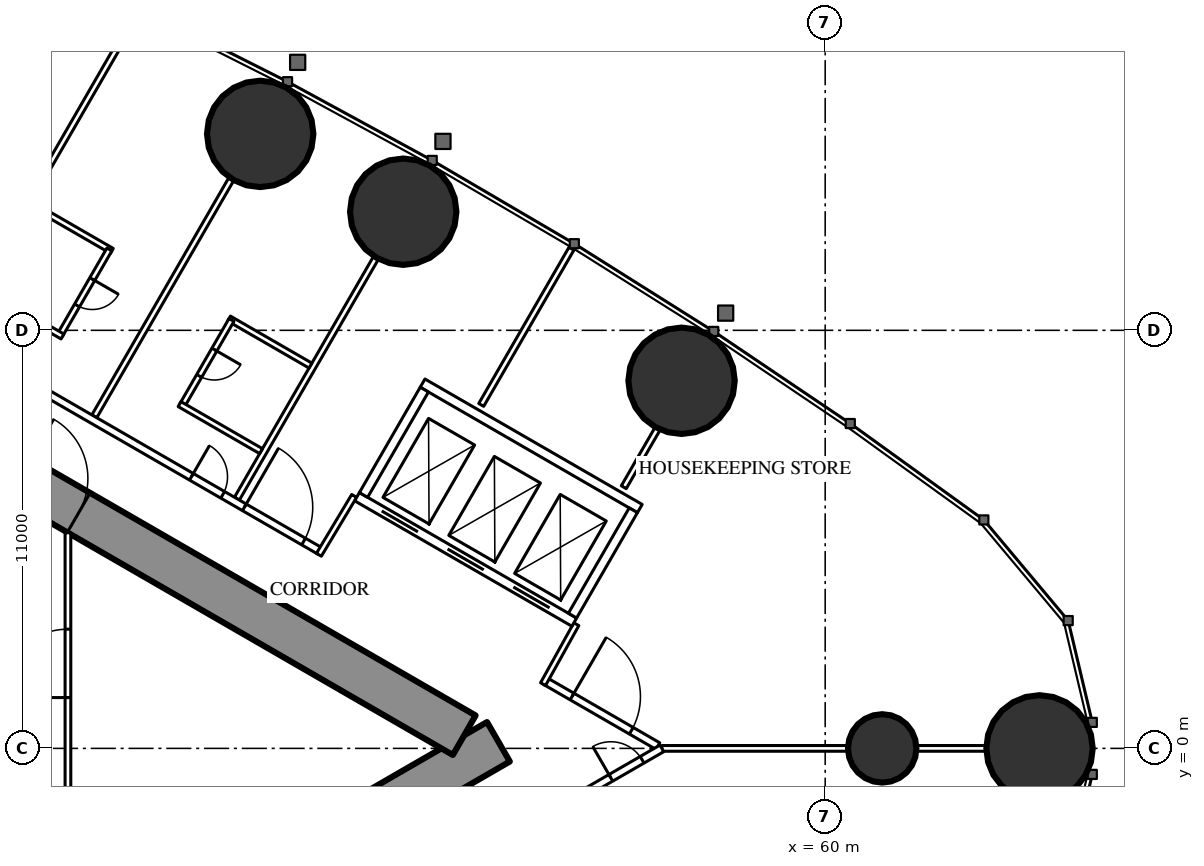
"""IFC4 building model, lengths in metres.
Left out: names, types, materials, properties, quantities, classifications, styles, units other than length and angle.
Written with IfcOpenShell. Run it as: python <this file> out.ifc"""

import sys

from ifc_helpers import new_model, si_unit, direction, frame, frame_2d, origin, origin_2d, place, context, subcontext, project, spatial, rectangle, circle, extrude, element, fill, save


model = new_model("IFC4")
c1 = context("Model", 3, precision=1e-05, world=origin(), true_north=direction((0.0, 1.0)))
c2 = subcontext(c1, "Body", "Model", "MODEL_VIEW")
j1 = project(units=[si_unit("LENGTHUNIT", "METRE"), si_unit("PLANEANGLEUNIT", "RADIAN")], contexts=[c1])
p1 = place(None, origin())
s1 = spatial("IfcSite", under=j1, at=p1, CompositionType="ELEMENT")
p2 = place(p1, origin())
s2 = spatial("IfcBuilding", under=s1, at=p2, CompositionType="ELEMENT")
p3 = place(p2, frame((0.0, 0.0, 180.8)))
s3 = spatial("IfcBuildingStorey", under=s2, at=p3, CompositionType="ELEMENT", Elevation=180.8)
for number, where, z_axis, x_axis in (
    (1, (65.64, 0.0, 0.0), (0.0, 0.0, 1.0), (1.0, 0.0, 0.0)),
    (2, (56.221, 9.672, 0.0), (0.0, 0.0, 1.0), (1.0, 0.0, 0.0)),
    (3, (48.897, 14.121, 0.0), (0.0, 0.0, 1.0), (1.0, 0.0, 0.0)),
    (4, (45.134, 16.168, 0.0), (0.0, 0.0, 1.0), (1.0, 0.0, 0.0)),
):
    element("IfcColumn", number, at=place(p3, frame(where, z_axis=z_axis, x_axis=x_axis)), inside=s3, PredefinedType="COLUMN", context=c2, shape_type="SweptSolid", body=[
        extrude(circle(Radius=1.4, at=origin_2d()), origin(), (0.0, 0.0, 1.0), 3.5),
    ])
p4 = place(p3, frame((61.5, 0.0, 0.0), z_axis=(0.0, 0.0, 1.0), x_axis=(1.0, 0.0, 0.0)))
e5 = element("IfcColumn", 5, at=p4, inside=s3, PredefinedType="COLUMN", context=c2, shape_type="SweptSolid", body=[
    extrude(circle(Radius=0.9, at=origin_2d()), origin(), (0.0, 0.0, 1.0), 3.5),
])
p5 = place(p3, frame((27.2, -13.8, 0.0), z_axis=(0.0, 0.0, 1.0), x_axis=(0.866027159892, 0.499996958321, 0.0)))
e6 = element("IfcWall", 6, at=p5, inside=s3, PredefinedType="SHEAR", context=c2, shape_type="SweptSolid", body=[
    extrude(rectangle(XDim=27.947, YDim=1.2, at=frame_2d((13.973, 0.0))), origin(), (0.0, 0.0, 1.0), 3.5),
])
p6 = place(p5, frame((4.6, 0.0, 0.0)))
e7 = element("IfcOpeningElement", 7, at=p6, cuts=e6, PredefinedType="OPENING", context=c2, shape_type="SweptSolid", body=[
    extrude(rectangle(XDim=1.0, YDim=2.2, at=frame_2d((0.5, 1.1))), frame((0.0, 0.61, 0.0), z_axis=(0.0, -1.0, 0.0), x_axis=(1.0, 0.0, 0.0)), (0.0, 0.0, 1.0), 1.22),
])
p7 = place(p5, frame((13.395, 0.0, 0.0)))
e8 = element("IfcOpeningElement", 8, at=p7, cuts=e6, PredefinedType="OPENING", context=c2, shape_type="SweptSolid", body=[
    extrude(rectangle(XDim=1.8, YDim=2.2, at=frame_2d((0.9, 1.1))), frame((0.0, 0.61, 0.0), z_axis=(0.0, -1.0, 0.0), x_axis=(1.0, 0.0, 0.0)), (0.0, 0.0, 1.0), 1.22),
])
p8 = place(p3, frame((27.2, 13.8, 0.0), z_axis=(0.0, 0.0, 1.0), x_axis=(0.866024515034, -0.500001539357, 0.0)))
e9 = element("IfcWall", 9, at=p8, inside=s3, PredefinedType="SHEAR", context=c2, shape_type="SweptSolid", body=[
    extrude(rectangle(XDim=26.907, YDim=1.2, at=frame_2d((13.454, 0.0))), origin(), (0.0, 0.0, 1.0), 3.5),
])
p9 = place(p8, frame((4.6, 0.0, 0.0)))
e10 = element("IfcOpeningElement", 10, at=p9, cuts=e9, PredefinedType="OPENING", context=c2, shape_type="SweptSolid", body=[
    extrude(rectangle(XDim=1.0, YDim=2.2, at=frame_2d((0.5, 1.1))), frame((0.0, 0.61, 0.0), z_axis=(0.0, -1.0, 0.0), x_axis=(1.0, 0.0, 0.0)), (0.0, 0.0, 1.0), 1.22),
])
p10 = place(p8, frame((13.395, 0.0, 0.0)))
e11 = element("IfcOpeningElement", 11, at=p10, cuts=e9, PredefinedType="OPENING", context=c2, shape_type="SweptSolid", body=[
    extrude(rectangle(XDim=1.8, YDim=2.2, at=frame_2d((0.9, 1.1))), frame((0.0, 0.61, 0.0), z_axis=(0.0, -1.0, 0.0), x_axis=(1.0, 0.0, 0.0)), (0.0, 0.0, 1.0), 1.22),
])
p11 = place(p3, frame((37.022, 10.9, 0.0), z_axis=(0.0, 0.0, 1.0), x_axis=(0.499998620953, 0.866026199976, 0.0)))
e12 = element("IfcWall", 12, at=p11, inside=s3, PredefinedType="PARTITIONING", context=c2, shape_type="SweptSolid", body=[
    extrude(rectangle(XDim=9.77, YDim=0.15, at=frame_2d((4.885, 0.0))), origin(), (0.0, 0.0, 1.0), 3.25),
])
p12 = place(p3, frame((40.769, 8.737, 0.0), z_axis=(0.0, 0.0, 1.0), x_axis=(0.500013115284, 0.866017831539, 0.0)))
e13 = element("IfcWall", 13, at=p12, inside=s3, PredefinedType="PARTITIONING", context=c2, shape_type="SweptSolid", body=[
    extrude(rectangle(XDim=7.198, YDim=0.15, at=frame_2d((3.599, 0.0))), origin(), (0.0, 0.0, 1.0), 2.3),
])
p13 = place(p3, frame((44.521, 6.571, 0.0), z_axis=(0.0, 0.0, 1.0), x_axis=(0.500020376429, 0.866013639128, 0.0)))
e14 = element("IfcWall", 14, at=p13, inside=s3, PredefinedType="PARTITIONING", context=c2, shape_type="SweptSolid", body=[
    extrude(rectangle(XDim=7.306, YDim=0.15, at=frame_2d((3.653, 0.0))), origin(), (0.0, 0.0, 1.0), 2.3),
])
p14 = place(p3, frame((55.702, 0.0, 0.0), z_axis=(0.0, 0.0, 1.0), x_axis=(1.0, 0.0, 0.0)))
e15 = element("IfcWall", 15, at=p14, inside=s3, PredefinedType="PARTITIONING", context=c2, shape_type="SweptSolid", body=[
    extrude(rectangle(XDim=8.518, YDim=0.15, at=frame_2d((4.259, 0.0))), origin(), (0.0, 0.0, 1.0), 2.3),
])
p15 = place(p3, frame((50.95, 9.037, 0.0), z_axis=(0.0, 0.0, 1.0), x_axis=(0.499988022762, 0.866032318735, 0.0)))
e16 = element("IfcWall", 16, at=p15, inside=s3, PredefinedType="PARTITIONING", context=c2, shape_type="SweptSolid", body=[
    extrude(rectangle(XDim=4.748, YDim=0.15, at=frame_2d((2.374, 0.0))), origin(), (0.0, 0.0, 1.0), 3.25),
])
p16 = place(p3, frame((54.7, 6.872, 0.0), z_axis=(0.0, 0.0, 1.0), x_axis=(0.499989690894, 0.866031355668, 0.0)))
e17 = element("IfcWall", 17, at=p16, inside=s3, PredefinedType="PARTITIONING", context=c2, shape_type="SweptSolid", body=[
    extrude(rectangle(XDim=1.766, YDim=0.15, at=frame_2d((0.883, 0.0))), origin(), (0.0, 0.0, 1.0), 3.25),
])
p17 = place(p3, frame((27.959, 16.017, 0.0), z_axis=(0.0, 0.0, 1.0), x_axis=(0.866027146794, -0.499996981007, 0.0)))
e18 = element("IfcWall", 18, at=p17, inside=s3, PredefinedType="PARTITIONING", context=c2, shape_type="SweptSolid", body=[
    extrude(rectangle(XDim=21.657, YDim=0.2, at=frame_2d((10.829, 0.0))), origin(), (0.0, 0.0, 1.0), 3.25),
])
p18 = place(p17, frame((17.741, 0.0, 0.0)))
e19 = element("IfcOpeningElement", 19, at=p18, cuts=e18, PredefinedType="OPENING", context=c2, shape_type="SweptSolid", body=[
    extrude(rectangle(XDim=0.95, YDim=2.2, at=frame_2d((0.475, 1.1))), frame((0.0, 0.11, 0.0), z_axis=(0.0, -1.0, 0.0), x_axis=(1.0, 0.0, 0.0)), (0.0, 0.0, 1.0), 0.22),
])
p19 = place(p17, frame((10.782, 0.0, 0.0)))
e20 = element("IfcOpeningElement", 20, at=p19, cuts=e18, PredefinedType="OPENING", context=c2, shape_type="SweptSolid", body=[
    extrude(rectangle(XDim=0.95, YDim=2.2, at=frame_2d((0.475, 1.1))), frame((0.0, 0.11, 0.0), z_axis=(0.0, -1.0, 0.0), x_axis=(1.0, 0.0, 0.0)), (0.0, 0.0, 1.0), 0.22),
])
p20 = place(p17, frame((6.732, 0.0, 0.0)))
e21 = element("IfcOpeningElement", 21, at=p20, cuts=e18, PredefinedType="OPENING", context=c2, shape_type="SweptSolid", body=[
    extrude(rectangle(XDim=0.95, YDim=2.2, at=frame_2d((0.475, 1.1))), frame((0.0, 0.11, 0.0), z_axis=(0.0, -1.0, 0.0), x_axis=(1.0, 0.0, 0.0)), (0.0, 0.0, 1.0), 0.22),
])
p21 = place(p17, frame((19.349, 0.0, 0.0)))
e22 = element("IfcOpeningElement", 22, at=p21, cuts=e18, PredefinedType="OPENING", context=c2, shape_type="SweptSolid", body=[
    extrude(rectangle(XDim=1.8, YDim=2.2, at=frame_2d((0.9, 1.1))), frame((0.0, 0.11, 0.0), z_axis=(0.0, -1.0, 0.0), x_axis=(1.0, 0.0, 0.0)), (0.0, 0.0, 1.0), 0.22),
])
p22 = place(p3, frame((52.639, 1.769, 0.0), z_axis=(0.0, 0.0, 1.0), x_axis=(0.866027340901, -0.4999966448, 0.0)))
e23 = element("IfcWall", 23, at=p22, inside=s3, PredefinedType="PARTITIONING", context=c2, shape_type="SweptSolid", body=[
    extrude(rectangle(XDim=3.417, YDim=0.2, at=frame_2d((1.708, 0.0))), origin(), (0.0, 0.0, 1.0), 3.25),
])
p23 = place(p22, frame((0.809, 0.0, 0.0)))
e24 = element("IfcOpeningElement", 24, at=p23, cuts=e23, PredefinedType="OPENING", context=c2, shape_type="SweptSolid", body=[
    extrude(rectangle(XDim=1.8, YDim=2.2, at=frame_2d((0.9, 1.1))), frame((0.0, 0.11, 0.0), z_axis=(0.0, -1.0, 0.0), x_axis=(1.0, 0.0, 0.0)), (0.0, 0.0, 1.0), 0.22),
])
for number, where, z_axis, x_axis in (
    (25, (52.576, 1.689, 0.0), (0.0, 0.0, 1.0), (0.485, 0.874, 0.0)),
    (26, (47.606, 6.643, 0.0), (0.0, 0.0, 1.0), (-0.514, -0.858, 0.0)),
):
    element("IfcWall", number, at=place(p3, frame(where, z_axis=z_axis, x_axis=x_axis)), inside=s3, PredefinedType="PARTITIONING", context=c2, shape_type="SweptSolid", body=[
        extrude(rectangle(XDim=1.805, YDim=0.15, at=frame_2d((0.902, 0.0))), origin(), (0.0, 0.0, 1.0), 3.25),
    ])
p24 = place(p3, frame((51.997, -2.139, 0.0), z_axis=(0.0, 0.0, 1.0), x_axis=(0.866036399848, 0.499980953776, 0.0)))
e27 = element("IfcWall", 27, at=p24, inside=s3, PredefinedType="PARTITIONING", context=c2, shape_type="SweptSolid", body=[
    extrude(rectangle(XDim=4.279, YDim=0.2, at=frame_2d((2.139, 0.0))), origin(), (0.0, 0.0, 1.0), 3.25),
])
p25 = place(p24, frame((2.729, 0.0, 0.0)))
e28 = element("IfcOpeningElement", 28, at=p25, cuts=e27, PredefinedType="OPENING", context=c2, shape_type="SweptSolid", body=[
    extrude(rectangle(XDim=0.95, YDim=2.2, at=frame_2d((0.475, 1.1))), frame((0.0, 0.11, 0.0), z_axis=(0.0, -1.0, 0.0), x_axis=(1.0, 0.0, 0.0)), (0.0, 0.0, 1.0), 0.22),
])
p26 = place(p3, frame((44.313, 11.31, 0.0), z_axis=(0.0, 0.0, 1.0), x_axis=(0.866031185235, -0.4999899861, 0.0)))
e29 = element("IfcWall", 29, at=p26, inside=s3, PredefinedType="PARTITIONING", context=c2, shape_type="SweptSolid", body=[
    extrude(rectangle(XDim=2.475, YDim=0.15, at=frame_2d((1.238, 0.0))), origin(), (0.0, 0.0, 1.0), 3.25),
])
p27 = place(p3, frame((43.078, 9.021, 0.0), z_axis=(0.0, 0.0, 1.0), x_axis=(0.49997716683, 0.86603858612, 0.0)))
e30 = element("IfcWall", 30, at=p27, inside=s3, PredefinedType="PARTITIONING", context=c2, shape_type="SweptSolid", body=[
    extrude(rectangle(XDim=2.6, YDim=0.15, at=frame_2d((1.3, 0.0))), origin(), (0.0, 0.0, 1.0), 3.25),
])
p28 = place(p27, frame((0.9, 0.0, 0.0)))
e31 = element("IfcOpeningElement", 31, at=p28, cuts=e30, PredefinedType="OPENING", context=c2, shape_type="SweptSolid", body=[
    extrude(rectangle(XDim=0.8, YDim=2.2, at=frame_2d((0.4, 1.1))), frame((0.0, 0.085, 0.0), z_axis=(0.0, -1.0, 0.0), x_axis=(1.0, 0.0, 0.0)), (0.0, 0.0, 1.0), 0.17),
])
p29 = place(p3, frame((43.013, 9.058, 0.0), z_axis=(0.0, 0.0, 1.0), x_axis=(0.866006523861, -0.500032699561, 0.0)))
e32 = element("IfcWall", 32, at=p29, inside=s3, PredefinedType="PARTITIONING", context=c2, shape_type="SweptSolid", body=[
    extrude(rectangle(XDim=2.475, YDim=0.15, at=frame_2d((1.237, 0.0))), origin(), (0.0, 0.0, 1.0), 2.45),
])
p30 = place(p3, frame((39.087, 14.327, 0.0), z_axis=(0.0, 0.0, 1.0), x_axis=(0.866006523861, -0.500032699561, 0.0)))
e33 = element("IfcWall", 33, at=p30, inside=s3, PredefinedType="PARTITIONING", context=c2, shape_type="SweptSolid", body=[
    extrude(rectangle(XDim=2.475, YDim=0.15, at=frame_2d((1.237, 0.0))), origin(), (0.0, 0.0, 1.0), 3.25),
])
p31 = place(p3, frame((39.865, 10.875, 0.0), z_axis=(0.0, 0.0, 1.0), x_axis=(0.500047596559, 0.865997922154, 0.0)))
e34 = element("IfcWall", 34, at=p31, inside=s3, PredefinedType="PARTITIONING", context=c2, shape_type="SweptSolid", body=[
    extrude(rectangle(XDim=2.6, YDim=0.15, at=frame_2d((1.3, 0.0))), origin(), (0.0, 0.0, 1.0), 3.25),
])
p32 = place(p31, frame((0.9, 0.0, 0.0)))
e35 = element("IfcOpeningElement", 35, at=p32, cuts=e34, PredefinedType="OPENING", context=c2, shape_type="SweptSolid", body=[
    extrude(rectangle(XDim=0.8, YDim=2.2, at=frame_2d((0.4, 1.1))), frame((0.0, 0.085, 0.0), z_axis=(0.0, -1.0, 0.0), x_axis=(1.0, 0.0, 0.0)), (0.0, 0.0, 1.0), 0.17),
])
p33 = place(p3, frame((37.787, 12.075, 0.0), z_axis=(0.0, 0.0, 1.0), x_axis=(0.866006523861, -0.500032699561, 0.0)))
e36 = element("IfcWall", 36, at=p33, inside=s3, PredefinedType="PARTITIONING", context=c2, shape_type="SweptSolid", body=[
    extrude(rectangle(XDim=2.475, YDim=0.15, at=frame_2d((1.237, 0.0))), origin(), (0.0, 0.0, 1.0), 3.25),
])
p34 = place(p3, frame((40.075, -1.2, 0.0), z_axis=(0.0, 0.0, 1.0), x_axis=(0.0, 1.0, 0.0)))
e37 = element("IfcWall", 37, at=p34, inside=s3, PredefinedType="PARTITIONING", context=c2, shape_type="SweptSolid", body=[
    extrude(rectangle(XDim=6.874, YDim=0.15, at=frame_2d((3.437, 0.0))), origin(), (0.0, 0.0, 1.0), 3.25),
])
p35 = place(p34, frame((2.537, 0.0, 0.0)))
e38 = element("IfcOpeningElement", 38, at=p35, cuts=e37, PredefinedType="OPENING", context=c2, shape_type="SweptSolid", body=[
    extrude(rectangle(XDim=1.8, YDim=2.2, at=frame_2d((0.9, 1.1))), frame((0.0, 0.085, 0.0), z_axis=(0.0, -1.0, 0.0), x_axis=(1.0, 0.0, 0.0)), (0.0, 0.0, 1.0), 0.17),
])
p36 = place(p3, frame((47.681, 6.622, 0.0), z_axis=(0.0, 0.0, 1.0), x_axis=(0.86603344179, -0.499986077507, 0.0)))
e39 = element("IfcWall", 39, at=p36, inside=s3, PredefinedType="PARTITIONING", context=c2, shape_type="SweptSolid", body=[
    extrude(rectangle(XDim=6.6, YDim=0.25, at=frame_2d((3.3, 0.0))), origin(), (0.0, 0.0, 1.0), 3.25),
])
p37 = place(p36, frame((0.75, 0.0, 0.0)))
e40 = element("IfcOpeningElement", 40, at=p37, cuts=e39, PredefinedType="OPENING", context=c2, shape_type="SweptSolid", body=[
    extrude(rectangle(XDim=1.1, YDim=2.2, at=frame_2d((0.55, 1.1))), frame((0.0, 0.135, 0.0), z_axis=(0.0, -1.0, 0.0), x_axis=(1.0, 0.0, 0.0)), (0.0, 0.0, 1.0), 0.27),
])
p38 = place(p36, frame((2.75, 0.0, 0.0)))
e41 = element("IfcOpeningElement", 41, at=p38, cuts=e39, PredefinedType="OPENING", context=c2, shape_type="SweptSolid", body=[
    extrude(rectangle(XDim=1.1, YDim=2.2, at=frame_2d((0.55, 1.1))), frame((0.0, 0.135, 0.0), z_axis=(0.0, -1.0, 0.0), x_axis=(1.0, 0.0, 0.0)), (0.0, 0.0, 1.0), 0.27),
])
p39 = place(p36, frame((4.75, 0.0, 0.0)))
e42 = element("IfcOpeningElement", 42, at=p39, cuts=e39, PredefinedType="OPENING", context=c2, shape_type="SweptSolid", body=[
    extrude(rectangle(XDim=1.1, YDim=2.2, at=frame_2d((0.55, 1.1))), frame((0.0, 0.135, 0.0), z_axis=(0.0, -1.0, 0.0), x_axis=(1.0, 0.0, 0.0)), (0.0, 0.0, 1.0), 0.27),
])
p40 = place(p3, frame((49.406, 9.611, 0.0), z_axis=(0.0, 0.0, 1.0), x_axis=(0.86603344179, -0.499986077507, 0.0)))
e43 = element("IfcWall", 43, at=p40, inside=s3, PredefinedType="PARTITIONING", context=c2, shape_type="SweptSolid", body=[
    extrude(rectangle(XDim=6.6, YDim=0.25, at=frame_2d((3.3, 0.0))), origin(), (0.0, 0.0, 1.0), 3.25),
])
p41 = place(p3, frame((47.852, 6.668, 0.0), z_axis=(0.0, 0.0, 1.0), x_axis=(0.499929347863, 0.866066190972, 0.0)))
e44 = element("IfcWall", 44, at=p41, inside=s3, PredefinedType="PARTITIONING", context=c2, shape_type="SweptSolid", body=[
    extrude(rectangle(XDim=3.201, YDim=0.25, at=frame_2d((1.6, 0.0))), origin(), (0.0, 0.0, 1.0), 3.25),
])
p42 = place(p3, frame((53.352, 3.493, 0.0), z_axis=(0.0, 0.0, 1.0), x_axis=(0.499872130319, 0.866099216793, 0.0)))
e45 = element("IfcWall", 45, at=p42, inside=s3, PredefinedType="PARTITIONING", context=c2, shape_type="SweptSolid", body=[
    extrude(rectangle(XDim=3.2, YDim=0.25, at=frame_2d((1.6, 0.0))), origin(), (0.0, 0.0, 1.0), 3.25),
])
p43 = place(p25, origin())
e46 = element("IfcDoor", 46, at=p43, inside=s3, OperationType="SINGLE_SWING_LEFT", PredefinedType="DOOR", context=c2, shape_type="SweptSolid", body=[
    extrude(rectangle(XDim=0.95, YDim=2.2, at=frame_2d((0.475, 1.1))), frame((0.0, 0.025, 0.0), z_axis=(0.0, -1.0, 0.0), x_axis=(1.0, 0.0, 0.0)), (0.0, 0.0, 1.0), 0.05),
])
fill(e28, e46)
p44 = place(p28, origin())
e47 = element("IfcDoor", 47, at=p44, inside=s3, OperationType="SINGLE_SWING_RIGHT", PredefinedType="DOOR", context=c2, shape_type="SweptSolid", body=[
    extrude(rectangle(XDim=0.8, YDim=2.2, at=frame_2d((0.4, 1.1))), frame((0.0, 0.025, 0.0), z_axis=(0.0, -1.0, 0.0), x_axis=(1.0, 0.0, 0.0)), (0.0, 0.0, 1.0), 0.05),
])
fill(e31, e47)
p45 = place(p18, origin())
e48 = element("IfcDoor", 48, at=p45, inside=s3, OperationType="SINGLE_SWING_LEFT", PredefinedType="DOOR", context=c2, shape_type="SweptSolid", body=[
    extrude(rectangle(XDim=0.95, YDim=2.2, at=frame_2d((0.475, 1.1))), frame((0.0, 0.025, 0.0), z_axis=(0.0, -1.0, 0.0), x_axis=(1.0, 0.0, 0.0)), (0.0, 0.0, 1.0), 0.05),
])
fill(e19, e48)
p46 = place(p32, origin())
e49 = element("IfcDoor", 49, at=p46, inside=s3, OperationType="SINGLE_SWING_RIGHT", PredefinedType="DOOR", context=c2, shape_type="SweptSolid", body=[
    extrude(rectangle(XDim=0.8, YDim=2.2, at=frame_2d((0.4, 1.1))), frame((0.0, 0.025, 0.0), z_axis=(0.0, -1.0, 0.0), x_axis=(1.0, 0.0, 0.0)), (0.0, 0.0, 1.0), 0.05),
])
fill(e35, e49)
p47 = place(p23, origin())
e50 = element("IfcDoor", 50, at=p47, inside=s3, OperationType="DOUBLE_DOOR_SINGLE_SWING", PredefinedType="DOOR", context=c2, shape_type="SweptSolid", body=[
    extrude(rectangle(XDim=1.8, YDim=2.2, at=frame_2d((0.9, 1.1))), frame((0.0, 0.025, 0.0), z_axis=(0.0, -1.0, 0.0), x_axis=(1.0, 0.0, 0.0)), (0.0, 0.0, 1.0), 0.05),
])
fill(e24, e50)
p48 = place(p21, origin())
e51 = element("IfcDoor", 51, at=p48, inside=s3, OperationType="DOUBLE_DOOR_SINGLE_SWING", PredefinedType="DOOR", context=c2, shape_type="SweptSolid", body=[
    extrude(rectangle(XDim=1.8, YDim=2.2, at=frame_2d((0.9, 1.1))), frame((0.0, 0.025, 0.0), z_axis=(0.0, -1.0, 0.0), x_axis=(1.0, 0.0, 0.0)), (0.0, 0.0, 1.0), 0.05),
])
fill(e22, e51)
p49 = place(p35, origin())
e52 = element("IfcDoor", 52, at=p49, inside=s3, OperationType="DOUBLE_DOOR_SINGLE_SWING", PredefinedType="DOOR", context=c2, shape_type="SweptSolid", body=[
    extrude(rectangle(XDim=1.8, YDim=2.2, at=frame_2d((0.9, 1.1))), frame((0.0, 0.025, 0.0), z_axis=(0.0, -1.0, 0.0), x_axis=(1.0, 0.0, 0.0)), (0.0, 0.0, 1.0), 0.05),
])
fill(e38, e52)
p50 = place(p10, origin())
e53 = element("IfcDoor", 53, at=p50, inside=s3, OperationType="DOUBLE_DOOR_SINGLE_SWING", PredefinedType="DOOR", context=c2, shape_type="SweptSolid", body=[
    extrude(rectangle(XDim=1.8, YDim=2.2, at=frame_2d((0.9, 1.1))), frame((0.0, 0.025, 0.0), z_axis=(0.0, -1.0, 0.0), x_axis=(1.0, 0.0, 0.0)), (0.0, 0.0, 1.0), 0.05),
])
fill(e11, e53)
p51 = place(p37, origin())
e54 = element("IfcDoor", 54, at=p51, inside=s3, OperationType="DOUBLE_DOOR_SLIDING", PredefinedType="USERDEFINED", context=c2, shape_type="SweptSolid", body=[
    extrude(rectangle(XDim=1.1, YDim=2.2, at=frame_2d((0.55, 1.1))), frame((0.0, 0.025, 0.0), z_axis=(0.0, -1.0, 0.0), x_axis=(1.0, 0.0, 0.0)), (0.0, 0.0, 1.0), 0.05),
])
fill(e40, e54)
p52 = place(p38, origin())
e55 = element("IfcDoor", 55, at=p52, inside=s3, OperationType="DOUBLE_DOOR_SLIDING", PredefinedType="USERDEFINED", context=c2, shape_type="SweptSolid", body=[
    extrude(rectangle(XDim=1.1, YDim=2.2, at=frame_2d((0.55, 1.1))), frame((0.0, 0.025, 0.0), z_axis=(0.0, -1.0, 0.0), x_axis=(1.0, 0.0, 0.0)), (0.0, 0.0, 1.0), 0.05),
])
fill(e41, e55)
p53 = place(p39, origin())
e56 = element("IfcDoor", 56, at=p53, inside=s3, OperationType="DOUBLE_DOOR_SLIDING", PredefinedType="USERDEFINED", context=c2, shape_type="SweptSolid", body=[
    extrude(rectangle(XDim=1.1, YDim=2.2, at=frame_2d((0.55, 1.1))), frame((0.0, 0.025, 0.0), z_axis=(0.0, -1.0, 0.0), x_axis=(1.0, 0.0, 0.0)), (0.0, 0.0, 1.0), 0.05),
])
fill(e42, e56)
save(model, sys.argv[1])
